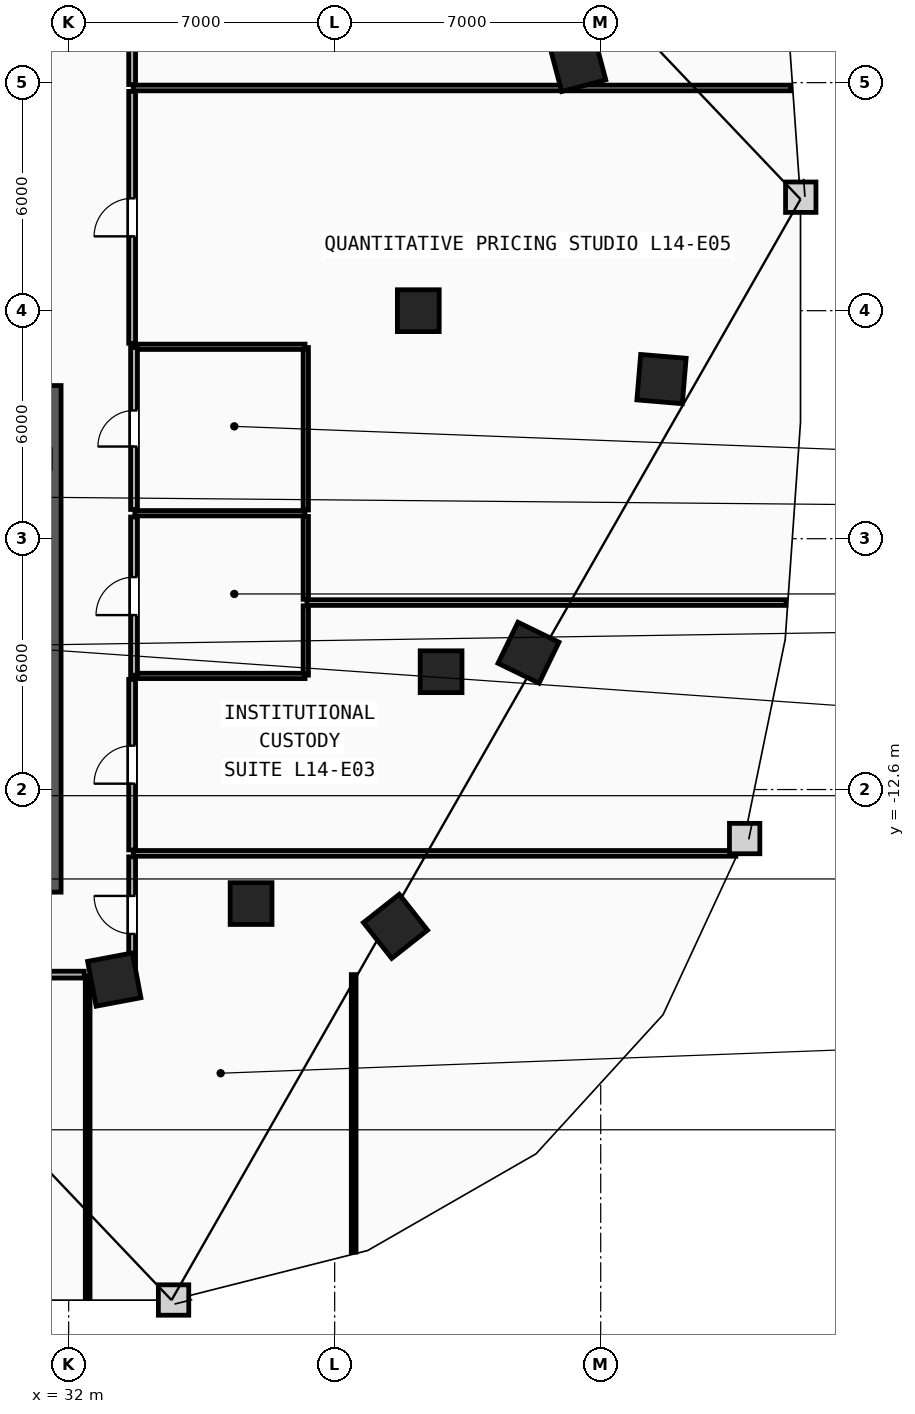
"""IFC4 building model, lengths in metres.
Left out: names, types, materials, properties, quantities, classifications, styles, units other than length and angle.
Written with IfcOpenShell. Run it as: python <this file> out.ifc"""

import sys

from ifc_helpers import new_model, si_unit, direction, frame, frame_2d, origin, origin_2d, place, context, subcontext, project, spatial, rectangle, extrude, element, fill, save


model = new_model("IFC4")
c1 = context("Model", 3, precision=1e-05, world=origin(), true_north=direction((0.0, 1.0)))
c2 = subcontext(c1, "Body", "Model", "MODEL_VIEW")
j1 = project(units=[si_unit("LENGTHUNIT", "METRE"), si_unit("PLANEANGLEUNIT", "RADIAN")], contexts=[c1])
p1 = place(None, origin())
s1 = spatial("IfcSite", under=j1, at=p1, CompositionType="ELEMENT")
p2 = place(p1, origin())
s2 = spatial("IfcBuilding", under=s1, at=p2, CompositionType="ELEMENT")
p3 = place(p2, frame((0.0, 0.0, 58.2)))
s3 = spatial("IfcBuildingStorey", under=s2, at=p3, CompositionType="ELEMENT", Elevation=58.2)
for number, where, z_axis, x_axis in (
    (1, (41.2, 0.0, 0.0), (0.0, 0.0, 1.0), (1.0, 0.0, 0.0)),
    (2, (41.8, -9.5, 0.0), (0.0, 0.0, 1.0), (1.0, 0.0, 0.0)),
    (3, (36.8, -15.6, 0.0), (0.0, 0.0, 1.0), (1.0, 0.0, 0.0)),
):
    element("IfcColumn", number, at=place(p3, frame(where, z_axis=z_axis, x_axis=x_axis)), inside=s3, PredefinedType="COLUMN", context=c2, shape_type="SweptSolid", body=[
        extrude(rectangle(XDim=1.1, YDim=1.1, at=origin_2d()), origin(), (0.0, 0.0, 1.0), 3.8),
    ])
for number, where, z_axis, x_axis in (
    (4, (33.2, -17.6, 0.0), (0.0, 0.0, 1.0), (0.983, 0.186, 0.0)),
    (5, (40.6, -16.2, 0.0), (0.0, 0.0, 1.0), (0.785, 0.619, 0.0)),
    (6, (44.1, -9.0, 0.0), (0.0, 0.0, 1.0), (0.437, 0.899, 0.0)),
    (7, (47.6, -1.8, 0.0), (0.0, 0.0, 1.0), (0.084, 0.997, 0.0)),
    (8, (45.4, 6.5, 0.0), (0.0, 0.0, 1.0), (-0.256, 0.967, 0.0)),
):
    element("IfcColumn", number, at=place(p3, frame(where, z_axis=z_axis, x_axis=x_axis)), inside=s3, PredefinedType="COLUMN", context=c2, shape_type="SweptSolid", body=[
        extrude(rectangle(XDim=1.2, YDim=1.2, at=origin_2d()), origin(), (0.0, 0.0, 1.0), 3.8),
    ])
p4 = place(p3, frame((31.35, -15.3, 0.0), z_axis=(0.0, 0.0, 1.0), x_axis=(0.0, 1.0, 0.0)))
e9 = element("IfcWall", 9, at=p4, inside=s3, PredefinedType="SHEAR", context=c2, shape_type="SweptSolid", body=[
    extrude(rectangle(XDim=13.33, YDim=0.9, at=frame_2d((6.665, 0.0))), origin(), (0.0, 0.0, 1.0), 3.5),
])
p5 = place(p3, frame((38.24, -9.59, 0.0), z_axis=(0.0, 0.0, 1.0), x_axis=(0.0, 1.0, 0.0)))
e10 = element("IfcWall", 10, at=p5, inside=s3, PredefinedType="PARTITIONING", context=c2, shape_type="SweptSolid", body=[
    extrude(rectangle(XDim=1.825, YDim=0.14, at=frame_2d((0.913, 0.0))), origin(), (0.0, 0.0, 1.0), 3.5),
])
p6 = place(p3, frame((38.24, -7.595, 0.0), z_axis=(0.0, 0.0, 1.0), x_axis=(0.0, 1.0, 0.0)))
e11 = element("IfcWall", 11, at=p6, inside=s3, PredefinedType="PARTITIONING", context=c2, shape_type="SweptSolid", body=[
    extrude(rectangle(XDim=2.18, YDim=0.14, at=frame_2d((1.09, 0.0))), origin(), (0.0, 0.0, 1.0), 3.5),
])
p7 = place(p3, frame((38.24, -5.245, 0.0), z_axis=(0.0, 0.0, 1.0), x_axis=(0.0, 1.0, 0.0)))
e12 = element("IfcWall", 12, at=p7, inside=s3, PredefinedType="PARTITIONING", context=c2, shape_type="SweptSolid", body=[
    extrude(rectangle(XDim=4.275, YDim=0.14, at=frame_2d((2.138, 0.0))), origin(), (0.0, 0.0, 1.0), 3.5),
])
for number, where, z_axis, x_axis in (
    (13, (33.74, -0.95, 0.0), (0.0, 0.0, 1.0), (1.0, 0.0, 0.0)),
    (14, (33.74, -5.33, 0.0), (0.0, 0.0, 1.0), (1.0, 0.0, 0.0)),
    (15, (33.74, -9.61, 0.0), (0.0, 0.0, 1.0), (1.0, 0.0, 0.0)),
):
    element("IfcWall", number, at=place(p3, frame(where, z_axis=z_axis, x_axis=x_axis)), inside=s3, PredefinedType="PARTITIONING", context=c2, shape_type="SweptSolid", body=[
        extrude(rectangle(XDim=4.48, YDim=0.14, at=frame_2d((2.24, 0.0))), origin(), (0.0, 0.0, 1.0), 3.5),
    ])
p8 = place(p3, frame((33.72, -5.23, 0.0), z_axis=(0.0, 0.0, 1.0), x_axis=(0.0, 1.0, 0.0)))
e16 = element("IfcWall", 16, at=p8, inside=s3, PredefinedType="PARTITIONING", context=c2, shape_type="SweptSolid", body=[
    extrude(rectangle(XDim=4.26, YDim=0.18, at=frame_2d((2.13, 0.0))), origin(), (0.0, 0.0, 1.0), 3.5),
])
p9 = place(p8, frame((1.655, 0.0, 0.0)))
e17 = element("IfcOpeningElement", 17, at=p9, cuts=e16, PredefinedType="OPENING", context=c2, shape_type="SweptSolid", body=[
    extrude(rectangle(XDim=0.95, YDim=2.1, at=frame_2d((0.475, 1.05))), frame((0.0, 0.1, 0.0), z_axis=(0.0, -1.0, 0.0), x_axis=(1.0, 0.0, 0.0)), (0.0, 0.0, 1.0), 0.2),
])
p10 = place(p3, frame((33.72, -9.59, 0.0), z_axis=(0.0, 0.0, 1.0), x_axis=(0.0, 1.0, 0.0)))
e18 = element("IfcWall", 18, at=p10, inside=s3, PredefinedType="PARTITIONING", context=c2, shape_type="SweptSolid", body=[
    extrude(rectangle(XDim=4.16, YDim=0.18, at=frame_2d((2.08, 0.0))), origin(), (0.0, 0.0, 1.0), 3.5),
])
p11 = place(p10, frame((1.58, 0.0, 0.0)))
e19 = element("IfcOpeningElement", 19, at=p11, cuts=e18, PredefinedType="OPENING", context=c2, shape_type="SweptSolid", body=[
    extrude(rectangle(XDim=1.0, YDim=2.15, at=frame_2d((0.5, 1.075))), frame((0.0, 0.1, 0.0), z_axis=(0.0, -1.0, 0.0), x_axis=(1.0, 0.0, 0.0)), (0.0, 0.0, 1.0), 0.2),
])
p12 = place(p3, frame((33.7, 5.86, 0.0), z_axis=(0.0, 0.0, 1.0), x_axis=(1.0, 0.0, 0.0)))
e20 = element("IfcWall", 20, at=p12, inside=s3, PredefinedType="PARTITIONING", context=c2, shape_type="SweptSolid", body=[
    extrude(rectangle(XDim=17.302, YDim=0.15, at=frame_2d((8.651, 0.0))), origin(), (0.0, 0.0, 1.0), 3.5),
])
p13 = place(p3, frame((38.27, -7.68, 0.0), z_axis=(0.0, 0.0, 1.0), x_axis=(1.0, 0.0, 0.0)))
e21 = element("IfcWall", 21, at=p13, inside=s3, PredefinedType="PARTITIONING", context=c2, shape_type="SweptSolid", body=[
    extrude(rectangle(XDim=12.604, YDim=0.15, at=frame_2d((6.302, 0.0))), origin(), (0.0, 0.0, 1.0), 3.5),
])
p14 = place(p3, frame((33.7, -14.28, 0.0), z_axis=(0.0, 0.0, 1.0), x_axis=(1.0, 0.0, 0.0)))
e22 = element("IfcWall", 22, at=p14, inside=s3, PredefinedType="PARTITIONING", context=c2, shape_type="SweptSolid", body=[
    extrude(rectangle(XDim=15.857, YDim=0.15, at=frame_2d((7.928, 0.0))), origin(), (0.0, 0.0, 1.0), 3.5),
])
p15 = place(p3, frame((32.5, -25.985, 0.0), z_axis=(0.0, 0.0, 1.0), x_axis=(0.0, 1.0, 0.0)))
e23 = element("IfcWall", 23, at=p15, inside=s3, PredefinedType="PARTITIONING", context=c2, shape_type="SweptSolid", body=[
    extrude(rectangle(XDim=8.485, YDim=0.125, at=frame_2d((4.243, 0.0))), origin(), (0.0, 0.0, 1.0), 3.5),
])
p16 = place(p3, frame((39.5, -24.772, 0.0), z_axis=(0.0, 0.0, 1.0), x_axis=(0.0, 1.0, 0.0)))
e24 = element("IfcWall", 24, at=p16, inside=s3, PredefinedType="PARTITIONING", context=c2, shape_type="SweptSolid", body=[
    extrude(rectangle(XDim=7.302, YDim=0.125, at=frame_2d((3.651, 0.0))), origin(), (0.0, 0.0, 1.0), 3.5),
])
p17 = place(p3, frame((24.59, -17.47, 0.0), z_axis=(0.0, 0.0, 1.0), x_axis=(1.0, 0.0, 0.0)))
e25 = element("IfcWall", 25, at=p17, inside=s3, PredefinedType="PARTITIONING", context=c2, shape_type="SweptSolid", body=[
    extrude(rectangle(XDim=7.82, YDim=0.18, at=frame_2d((3.91, 0.0))), origin(), (0.0, 0.0, 1.0), 3.5),
])
p18 = place(p17, frame((3.41, 0.0, 0.0)))
e26 = element("IfcOpeningElement", 26, at=p18, cuts=e25, PredefinedType="OPENING", context=c2, shape_type="SweptSolid", body=[
    extrude(rectangle(XDim=1.0, YDim=2.15, at=frame_2d((0.5, 1.075))), frame((0.0, 0.1, 0.0), z_axis=(0.0, -1.0, 0.0), x_axis=(1.0, 0.0, 0.0)), (0.0, 0.0, 1.0), 0.2),
])
p19 = place(p3, frame((33.67, -17.428, 0.0), z_axis=(0.0, 0.0, 1.0), x_axis=(0.0, 1.0, 0.0)))
e27 = element("IfcWall", 27, at=p19, inside=s3, PredefinedType="PARTITIONING", context=c2, shape_type="SweptSolid", body=[
    extrude(rectangle(XDim=3.058, YDim=0.18, at=frame_2d((1.529, 0.0))), origin(), (0.0, 0.0, 1.0), 3.5),
])
p20 = place(p19, frame((1.029, 0.0, 0.0)))
e28 = element("IfcOpeningElement", 28, at=p20, cuts=e27, PredefinedType="OPENING", context=c2, shape_type="SweptSolid", body=[
    extrude(rectangle(XDim=1.0, YDim=2.15, at=frame_2d((0.5, 1.075))), frame((0.0, 0.1, 0.0), z_axis=(0.0, -1.0, 0.0), x_axis=(1.0, 0.0, 0.0)), (0.0, 0.0, 1.0), 0.2),
])
p21 = place(p3, frame((32.59, -17.47, 0.0), z_axis=(0.0, 0.0, 1.0), x_axis=(1.0, 0.0, 0.0)))
e29 = element("IfcWall", 29, at=p21, inside=s3, PredefinedType="PARTITIONING", context=c2, shape_type="SweptSolid", body=[
    extrude(rectangle(XDim=1.038, YDim=0.18, at=frame_2d((0.519, 0.0))), origin(), (0.0, 0.0, 1.0), 3.5),
])
p22 = place(p3, frame((33.67, -14.19, 0.0), z_axis=(0.0, 0.0, 1.0), x_axis=(0.0, 1.0, 0.0)))
e30 = element("IfcWall", 30, at=p22, inside=s3, PredefinedType="PARTITIONING", context=c2, shape_type="SweptSolid", body=[
    extrude(rectangle(XDim=4.489, YDim=0.18, at=frame_2d((2.244, 0.0))), origin(), (0.0, 0.0, 1.0), 3.5),
])
p23 = place(p22, frame((1.744, 0.0, 0.0)))
e31 = element("IfcOpeningElement", 31, at=p23, cuts=e30, PredefinedType="OPENING", context=c2, shape_type="SweptSolid", body=[
    extrude(rectangle(XDim=1.0, YDim=2.15, at=frame_2d((0.5, 1.075))), frame((0.0, 0.1, 0.0), z_axis=(0.0, -1.0, 0.0), x_axis=(1.0, 0.0, 0.0)), (0.0, 0.0, 1.0), 0.2),
])
p24 = place(p3, frame((33.67, -0.859, 0.0), z_axis=(0.0, 0.0, 1.0), x_axis=(0.0, 1.0, 0.0)))
e32 = element("IfcWall", 32, at=p24, inside=s3, PredefinedType="PARTITIONING", context=c2, shape_type="SweptSolid", body=[
    extrude(rectangle(XDim=6.629, YDim=0.18, at=frame_2d((3.314, 0.0))), origin(), (0.0, 0.0, 1.0), 3.5),
])
p25 = place(p24, frame((2.814, 0.0, 0.0)))
e33 = element("IfcOpeningElement", 33, at=p25, cuts=e32, PredefinedType="OPENING", context=c2, shape_type="SweptSolid", body=[
    extrude(rectangle(XDim=1.0, YDim=2.15, at=frame_2d((0.5, 1.075))), frame((0.0, 0.1, 0.0), z_axis=(0.0, -1.0, 0.0), x_axis=(1.0, 0.0, 0.0)), (0.0, 0.0, 1.0), 0.2),
])
p26 = place(p3, frame((33.67, 5.95, 0.0), z_axis=(0.0, 0.0, 1.0), x_axis=(0.0, 1.0, 0.0)))
e34 = element("IfcWall", 34, at=p26, inside=s3, PredefinedType="PARTITIONING", context=c2, shape_type="SweptSolid", body=[
    extrude(rectangle(XDim=5.45, YDim=0.18, at=frame_2d((2.725, 0.0))), origin(), (0.0, 0.0, 1.0), 3.5),
])
p27 = place(p25, origin())
e35 = element("IfcDoor", 35, at=p27, inside=s3, OperationType="SINGLE_SWING_LEFT", PredefinedType="DOOR", context=c2, shape_type="SweptSolid", body=[
    extrude(rectangle(XDim=1.0, YDim=2.15, at=frame_2d((0.5, 1.075))), frame((0.0, 0.025, 0.0), z_axis=(0.0, -1.0, 0.0), x_axis=(1.0, 0.0, 0.0)), (0.0, 0.0, 1.0), 0.05),
])
fill(e33, e35)
p28 = place(p23, origin())
e36 = element("IfcDoor", 36, at=p28, inside=s3, OperationType="SINGLE_SWING_LEFT", PredefinedType="DOOR", context=c2, shape_type="SweptSolid", body=[
    extrude(rectangle(XDim=1.0, YDim=2.15, at=frame_2d((0.5, 1.075))), frame((0.0, 0.025, 0.0), z_axis=(0.0, -1.0, 0.0), x_axis=(1.0, 0.0, 0.0)), (0.0, 0.0, 1.0), 0.05),
])
fill(e31, e36)
p29 = place(p9, origin())
e37 = element("IfcDoor", 37, at=p29, inside=s3, OperationType="SINGLE_SWING_LEFT", PredefinedType="DOOR", context=c2, shape_type="SweptSolid", body=[
    extrude(rectangle(XDim=0.95, YDim=2.1, at=frame_2d((0.475, 1.05))), frame((0.0, 0.025, 0.0), z_axis=(0.0, -1.0, 0.0), x_axis=(1.0, 0.0, 0.0)), (0.0, 0.0, 1.0), 0.05),
])
fill(e17, e37)
p30 = place(p11, origin())
e38 = element("IfcDoor", 38, at=p30, inside=s3, OperationType="SINGLE_SWING_LEFT", PredefinedType="DOOR", context=c2, shape_type="SweptSolid", body=[
    extrude(rectangle(XDim=1.0, YDim=2.15, at=frame_2d((0.5, 1.075))), frame((0.0, 0.025, 0.0), z_axis=(0.0, -1.0, 0.0), x_axis=(1.0, 0.0, 0.0)), (0.0, 0.0, 1.0), 0.05),
])
fill(e19, e38)
p31 = place(p20, origin())
e39 = element("IfcDoor", 39, at=p31, inside=s3, OperationType="SINGLE_SWING_RIGHT", PredefinedType="DOOR", context=c2, shape_type="SweptSolid", body=[
    extrude(rectangle(XDim=1.0, YDim=2.15, at=frame_2d((0.5, 1.075))), frame((0.0, 0.025, 0.0), z_axis=(0.0, -1.0, 0.0), x_axis=(1.0, 0.0, 0.0)), (0.0, 0.0, 1.0), 0.05),
])
fill(e28, e39)
save(model, sys.argv[1])
